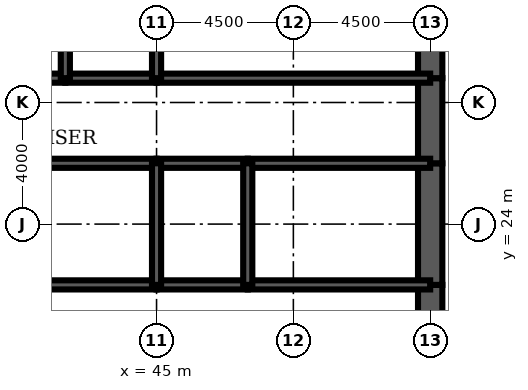
"""IFC4 building model, lengths in metres.
Left out: names, types, materials, properties, quantities, classifications, styles, units other than length and angle.
Written with IfcOpenShell. Run it as: python <this file> out.ifc"""

import sys

from ifc_helpers import new_model, si_unit, direction, frame, frame_2d, origin, place, context, subcontext, project, spatial, rectangle, extrude, element, fill, save


model = new_model("IFC4")
c1 = context("Model", 3, precision=1e-05, world=origin(), true_north=direction((0.0, 1.0)))
c2 = subcontext(c1, "Body", "Model", "MODEL_VIEW")
j1 = project(units=[si_unit("LENGTHUNIT", "METRE"), si_unit("PLANEANGLEUNIT", "RADIAN")], contexts=[c1])
p1 = place(None, origin())
s1 = spatial("IfcSite", under=j1, at=p1, CompositionType="ELEMENT")
p2 = place(p1, origin())
s2 = spatial("IfcBuilding", under=s1, at=p2, CompositionType="ELEMENT")
p3 = place(p2, frame((0.0, 0.0, 202.6)))
s3 = spatial("IfcBuildingStorey", under=s2, at=p3, CompositionType="ELEMENT", Elevation=202.6)
p4 = place(p3, frame((54.0, 19.2, 0.0), z_axis=(0.0, 0.0, 1.0), x_axis=(0.0, 1.0, 0.0)))
e1 = element("IfcWall", 1, at=p4, inside=s3, PredefinedType="SHEAR", context=c2, shape_type="SweptSolid", body=[
    extrude(rectangle(XDim=2.8, YDim=0.8, at=frame_2d((1.4, 0.0))), origin(), (0.0, 0.0, 1.0), 4.2),
])
p5 = place(p4, frame((0.4, 0.0, 0.0)))
e2 = element("IfcOpeningElement", 2, at=p5, cuts=e1, PredefinedType="OPENING", context=c2, shape_type="SweptSolid", body=[
    extrude(rectangle(XDim=1.8, YDim=2.1, at=frame_2d((0.9, 1.05))), frame((0.0, 0.41, 0.0), z_axis=(0.0, -1.0, 0.0), x_axis=(1.0, 0.0, 0.0)), (0.0, 0.0, 1.0), 0.82),
])
p6 = place(p3, frame((54.0, 22.0, 0.0), z_axis=(0.0, 0.0, 1.0), x_axis=(0.0, 1.0, 0.0)))
e3 = element("IfcWall", 3, at=p6, inside=s3, PredefinedType="SHEAR", context=c2, shape_type="SweptSolid", body=[
    extrude(rectangle(XDim=4.0, YDim=0.8, at=frame_2d((2.0, 0.0))), origin(), (0.0, 0.0, 1.0), 4.2),
])
p7 = place(p3, frame((54.0, 26.0, 0.0), z_axis=(0.0, 0.0, 1.0), x_axis=(0.0, 1.0, 0.0)))
e4 = element("IfcWall", 4, at=p7, inside=s3, PredefinedType="SHEAR", context=c2, shape_type="SweptSolid", body=[
    extrude(rectangle(XDim=2.8, YDim=0.8, at=frame_2d((1.4, 0.0))), origin(), (0.0, 0.0, 1.0), 4.2),
])
p8 = place(p7, frame((0.6, 0.0, 0.0)))
e5 = element("IfcOpeningElement", 5, at=p8, cuts=e4, PredefinedType="OPENING", context=c2, shape_type="SweptSolid", body=[
    extrude(rectangle(XDim=1.8, YDim=2.1, at=frame_2d((0.9, 1.05))), frame((0.0, 0.41, 0.0), z_axis=(0.0, -1.0, 0.0), x_axis=(1.0, 0.0, 0.0)), (0.0, 0.0, 1.0), 0.82),
])
p9 = place(p3, frame((54.0, 28.8, 0.0), z_axis=(0.0, 0.0, 1.0), x_axis=(0.0, 1.0, 0.0)))
e6 = element("IfcWall", 6, at=p9, inside=s3, PredefinedType="SHEAR", context=c2, shape_type="SweptSolid", body=[
    extrude(rectangle(XDim=3.2, YDim=0.8, at=frame_2d((1.6, 0.0))), origin(), (0.0, 0.0, 1.0), 4.2),
])
p10 = place(p3, frame((39.0, 28.8, 0.0), z_axis=(0.0, 0.0, 1.0), x_axis=(1.0, 0.0, 0.0)))
e7 = element("IfcWall", 7, at=p10, inside=s3, PredefinedType="SOLIDWALL", context=c2, shape_type="SweptSolid", body=[
    extrude(rectangle(XDim=3.0, YDim=0.3, at=frame_2d((1.5, 0.0))), origin(), (0.0, 0.0, 1.0), 4.2),
])
p11 = place(p3, frame((42.0, 28.8, 0.0), z_axis=(0.0, 0.0, 1.0), x_axis=(1.0, 0.0, 0.0)))
e8 = element("IfcWall", 8, at=p11, inside=s3, PredefinedType="SOLIDWALL", context=c2, shape_type="SweptSolid", body=[
    extrude(rectangle(XDim=3.0, YDim=0.3, at=frame_2d((1.5, 0.0))), origin(), (0.0, 0.0, 1.0), 4.2),
])
p12 = place(p11, frame((0.95, 0.0, 0.0)))
e9 = element("IfcOpeningElement", 9, at=p12, cuts=e8, PredefinedType="OPENING", context=c2, shape_type="SweptSolid", body=[
    extrude(rectangle(XDim=1.1, YDim=2.2, at=frame_2d((0.55, 1.1))), frame((0.0, 0.16, 0.0), z_axis=(0.0, -1.0, 0.0), x_axis=(1.0, 0.0, 0.0)), (0.0, 0.0, 1.0), 0.32),
])
p13 = place(p3, frame((45.0, 28.8, 0.0), z_axis=(0.0, 0.0, 1.0), x_axis=(1.0, 0.0, 0.0)))
e10 = element("IfcWall", 10, at=p13, inside=s3, PredefinedType="SOLIDWALL", context=c2, shape_type="SweptSolid", body=[
    extrude(rectangle(XDim=9.0, YDim=0.3, at=frame_2d((4.5, 0.0))), origin(), (0.0, 0.0, 1.0), 4.2),
])
p14 = place(p13, frame((7.35, 0.0, 0.0)))
e11 = element("IfcOpeningElement", 11, at=p14, cuts=e10, PredefinedType="OPENING", context=c2, shape_type="SweptSolid", body=[
    extrude(rectangle(XDim=1.0, YDim=2.1, at=frame_2d((0.5, 1.05))), frame((0.0, 0.16, 0.0), z_axis=(0.0, -1.0, 0.0), x_axis=(1.0, 0.0, 0.0)), (0.0, 0.0, 1.0), 0.32),
])
p15 = place(p3, frame((36.0, 22.0, 0.0), z_axis=(0.0, 0.0, 1.0), x_axis=(1.0, 0.0, 0.0)))
e12 = element("IfcWall", 12, at=p15, inside=s3, PredefinedType="SOLIDWALL", context=c2, shape_type="SweptSolid", body=[
    extrude(rectangle(XDim=9.0, YDim=0.3, at=frame_2d((4.5, 0.0))), origin(), (0.0, 0.0, 1.0), 4.2),
])
p16 = place(p15, frame((4.0, 0.0, 0.0)))
e13 = element("IfcOpeningElement", 13, at=p16, cuts=e12, PredefinedType="OPENING", context=c2, shape_type="SweptSolid", body=[
    extrude(rectangle(XDim=1.0, YDim=2.1, at=frame_2d((0.5, 1.05))), frame((0.0, 0.16, 0.0), z_axis=(0.0, -1.0, 0.0), x_axis=(1.0, 0.0, 0.0)), (0.0, 0.0, 1.0), 0.32),
])
p17 = place(p3, frame((45.0, 22.0, 0.0), z_axis=(0.0, 0.0, 1.0), x_axis=(1.0, 0.0, 0.0)))
e14 = element("IfcWall", 14, at=p17, inside=s3, PredefinedType="SOLIDWALL", context=c2, shape_type="SweptSolid", body=[
    extrude(rectangle(XDim=3.0, YDim=0.3, at=frame_2d((1.5, 0.0))), origin(), (0.0, 0.0, 1.0), 4.2),
])
p18 = place(p17, frame((1.0, 0.0, 0.0)))
e15 = element("IfcOpeningElement", 15, at=p18, cuts=e14, PredefinedType="OPENING", context=c2, shape_type="SweptSolid", body=[
    extrude(rectangle(XDim=1.0, YDim=2.1, at=frame_2d((0.5, 1.05))), frame((0.0, 0.16, 0.0), z_axis=(0.0, -1.0, 0.0), x_axis=(1.0, 0.0, 0.0)), (0.0, 0.0, 1.0), 0.32),
])
p19 = place(p3, frame((48.0, 22.0, 0.0), z_axis=(0.0, 0.0, 1.0), x_axis=(1.0, 0.0, 0.0)))
e16 = element("IfcWall", 16, at=p19, inside=s3, PredefinedType="SOLIDWALL", context=c2, shape_type="SweptSolid", body=[
    extrude(rectangle(XDim=6.0, YDim=0.3, at=frame_2d((3.0, 0.0))), origin(), (0.0, 0.0, 1.0), 4.2),
])
p20 = place(p19, frame((2.0, 0.0, 0.0)))
e17 = element("IfcOpeningElement", 17, at=p20, cuts=e16, PredefinedType="OPENING", context=c2, shape_type="SweptSolid", body=[
    extrude(rectangle(XDim=1.0, YDim=2.1, at=frame_2d((0.5, 1.05))), frame((0.0, 0.16, 0.0), z_axis=(0.0, -1.0, 0.0), x_axis=(1.0, 0.0, 0.0)), (0.0, 0.0, 1.0), 0.32),
])
p21 = place(p19, frame((4.35, 0.0, 0.0)))
e18 = element("IfcOpeningElement", 18, at=p21, cuts=e16, PredefinedType="OPENING", context=c2, shape_type="SweptSolid", body=[
    extrude(rectangle(XDim=1.0, YDim=2.1, at=frame_2d((0.5, 1.05))), frame((0.0, 0.16, 0.0), z_axis=(0.0, -1.0, 0.0), x_axis=(1.0, 0.0, 0.0)), (0.0, 0.0, 1.0), 0.32),
])
p22 = place(p3, frame((36.0, 26.0, 0.0), z_axis=(0.0, 0.0, 1.0), x_axis=(1.0, 0.0, 0.0)))
e19 = element("IfcWall", 19, at=p22, inside=s3, PredefinedType="SOLIDWALL", context=c2, shape_type="SweptSolid", body=[
    extrude(rectangle(XDim=9.0, YDim=0.3, at=frame_2d((4.5, 0.0))), origin(), (0.0, 0.0, 1.0), 4.2),
])
p23 = place(p3, frame((45.0, 26.0, 0.0), z_axis=(0.0, 0.0, 1.0), x_axis=(1.0, 0.0, 0.0)))
e20 = element("IfcWall", 20, at=p23, inside=s3, PredefinedType="SOLIDWALL", context=c2, shape_type="SweptSolid", body=[
    extrude(rectangle(XDim=3.0, YDim=0.3, at=frame_2d((1.5, 0.0))), origin(), (0.0, 0.0, 1.0), 4.2),
])
p24 = place(p3, frame((48.0, 26.0, 0.0), z_axis=(0.0, 0.0, 1.0), x_axis=(1.0, 0.0, 0.0)))
e21 = element("IfcWall", 21, at=p24, inside=s3, PredefinedType="SOLIDWALL", context=c2, shape_type="SweptSolid", body=[
    extrude(rectangle(XDim=6.0, YDim=0.3, at=frame_2d((3.0, 0.0))), origin(), (0.0, 0.0, 1.0), 4.2),
])
for number, where, z_axis, x_axis in (
    (22, (42.0, 28.8, 0.0), (0.0, 0.0, 1.0), (0.0, 1.0, 0.0)),
    (23, (45.0, 28.8, 0.0), (0.0, 0.0, 1.0), (0.0, 1.0, 0.0)),
):
    element("IfcWall", number, at=place(p3, frame(where, z_axis=z_axis, x_axis=x_axis)), inside=s3, PredefinedType="SOLIDWALL", context=c2, shape_type="SweptSolid", body=[
        extrude(rectangle(XDim=3.2, YDim=0.3, at=frame_2d((1.6, 0.0))), origin(), (0.0, 0.0, 1.0), 4.2),
    ])
for number, where, z_axis, x_axis in (
    (24, (45.0, 22.0, 0.0), (0.0, 0.0, 1.0), (0.0, 1.0, 0.0)),
    (25, (48.0, 22.0, 0.0), (0.0, 0.0, 1.0), (0.0, 1.0, 0.0)),
):
    element("IfcWall", number, at=place(p3, frame(where, z_axis=z_axis, x_axis=x_axis)), inside=s3, PredefinedType="SOLIDWALL", context=c2, shape_type="SweptSolid", body=[
        extrude(rectangle(XDim=4.0, YDim=0.3, at=frame_2d((2.0, 0.0))), origin(), (0.0, 0.0, 1.0), 4.2),
    ])
p25 = place(p3, frame((42.5, 22.15, 0.0), z_axis=(0.0, 0.0, 1.0), x_axis=(0.0, 1.0, 0.0)))
e26 = element("IfcWall", 26, at=p25, inside=s3, PredefinedType="PARTITIONING", context=c2, shape_type="SweptSolid", body=[
    extrude(rectangle(XDim=3.7, YDim=0.15, at=frame_2d((1.85, 0.0))), origin(), (0.0, 0.0, 1.0), 3.0),
])
p26 = place(p25, frame((2.2, 0.0, 0.0)))
e27 = element("IfcOpeningElement", 27, at=p26, cuts=e26, PredefinedType="OPENING", context=c2, shape_type="SweptSolid", body=[
    extrude(rectangle(XDim=1.0, YDim=2.1, at=frame_2d((0.5, 1.05))), frame((0.0, 0.085, 0.0), z_axis=(0.0, -1.0, 0.0), x_axis=(1.0, 0.0, 0.0)), (0.0, 0.0, 1.0), 0.17),
])
p27 = place(p3, frame((52.025, 22.15, 0.0), z_axis=(0.0, 0.0, 1.0), x_axis=(0.0, 1.0, 0.0)))
e28 = element("IfcWall", 28, at=p27, inside=s3, PredefinedType="PARTITIONING", context=c2, shape_type="SweptSolid", body=[
    extrude(rectangle(XDim=3.7, YDim=0.15, at=frame_2d((1.85, 0.0))), origin(), (0.0, 0.0, 1.0), 3.0),
])
p28 = place(p3, frame((49.2, 26.15, 0.0), z_axis=(0.0, 0.0, 1.0), x_axis=(0.0, 1.0, 0.0)))
e29 = element("IfcWall", 29, at=p28, inside=s3, PredefinedType="PARTITIONING", context=c2, shape_type="SweptSolid", body=[
    extrude(rectangle(XDim=2.5, YDim=0.15, at=frame_2d((1.25, 0.0))), origin(), (0.0, 0.0, 1.0), 3.0),
])
p29 = place(p28, frame((1.15, 0.0, 0.0)))
e30 = element("IfcOpeningElement", 30, at=p29, cuts=e29, PredefinedType="OPENING", context=c2, shape_type="SweptSolid", body=[
    extrude(rectangle(XDim=1.0, YDim=2.1, at=frame_2d((0.5, 1.05))), frame((0.0, 0.085, 0.0), z_axis=(0.0, -1.0, 0.0), x_axis=(1.0, 0.0, 0.0)), (0.0, 0.0, 1.0), 0.17),
])
p30 = place(p26, origin())
e31 = element("IfcDoor", 31, at=p30, inside=s3, OperationType="SINGLE_SWING_RIGHT", PredefinedType="DOOR", context=c2, shape_type="SweptSolid", body=[
    extrude(rectangle(XDim=1.0, YDim=2.1, at=frame_2d((0.5, 1.05))), frame((0.0, 0.025, 0.0), z_axis=(0.0, -1.0, 0.0), x_axis=(1.0, 0.0, 0.0)), (0.0, 0.0, 1.0), 0.05),
])
fill(e27, e31)
p31 = place(p29, origin())
e32 = element("IfcDoor", 32, at=p31, inside=s3, OperationType="SINGLE_SWING_RIGHT", PredefinedType="DOOR", context=c2, shape_type="SweptSolid", body=[
    extrude(rectangle(XDim=1.0, YDim=2.1, at=frame_2d((0.5, 1.05))), frame((0.0, 0.025, 0.0), z_axis=(0.0, -1.0, 0.0), x_axis=(1.0, 0.0, 0.0)), (0.0, 0.0, 1.0), 0.05),
])
fill(e30, e32)
p32 = place(p12, origin())
e33 = element("IfcDoor", 33, at=p32, inside=s3, OperationType="DOUBLE_DOOR_SLIDING", PredefinedType="USERDEFINED", context=c2, shape_type="SweptSolid", body=[
    extrude(rectangle(XDim=1.1, YDim=2.2, at=frame_2d((0.55, 1.1))), frame((0.0, 0.025, 0.0), z_axis=(0.0, -1.0, 0.0), x_axis=(1.0, 0.0, 0.0)), (0.0, 0.0, 1.0), 0.05),
])
fill(e9, e33)
p33 = place(p14, origin())
e34 = element("IfcDoor", 34, at=p33, inside=s3, OperationType="SINGLE_SWING_RIGHT", PredefinedType="DOOR", context=c2, shape_type="SweptSolid", body=[
    extrude(rectangle(XDim=1.0, YDim=2.1, at=frame_2d((0.5, 1.05))), frame((0.0, 0.025, 0.0), z_axis=(0.0, -1.0, 0.0), x_axis=(1.0, 0.0, 0.0)), (0.0, 0.0, 1.0), 0.05),
])
fill(e11, e34)
p34 = place(p5, origin())
e35 = element("IfcDoor", 35, at=p34, inside=s3, OperationType="SINGLE_SWING_LEFT", PredefinedType="DOOR", context=c2, shape_type="SweptSolid", body=[
    extrude(rectangle(XDim=1.8, YDim=2.1, at=frame_2d((0.9, 1.05))), frame((0.0, 0.4, 0.0), z_axis=(0.0, -1.0, 0.0), x_axis=(1.0, 0.0, 0.0)), (0.0, 0.0, 1.0), 0.8),
])
fill(e2, e35)
p35 = place(p8, origin())
e36 = element("IfcDoor", 36, at=p35, inside=s3, OperationType="SINGLE_SWING_LEFT", PredefinedType="DOOR", context=c2, shape_type="SweptSolid", body=[
    extrude(rectangle(XDim=1.8, YDim=2.1, at=frame_2d((0.9, 1.05))), frame((0.0, 0.4, 0.0), z_axis=(0.0, -1.0, 0.0), x_axis=(1.0, 0.0, 0.0)), (0.0, 0.0, 1.0), 0.8),
])
fill(e5, e36)
p36 = place(p18, origin())
e37 = element("IfcDoor", 37, at=p36, inside=s3, OperationType="SINGLE_SWING_LEFT", PredefinedType="DOOR", context=c2, shape_type="SweptSolid", body=[
    extrude(rectangle(XDim=1.0, YDim=2.1, at=frame_2d((0.5, 1.05))), frame((0.0, 0.025, 0.0), z_axis=(0.0, -1.0, 0.0), x_axis=(1.0, 0.0, 0.0)), (0.0, 0.0, 1.0), 0.05),
])
fill(e15, e37)
p37 = place(p20, origin())
e38 = element("IfcDoor", 38, at=p37, inside=s3, OperationType="SINGLE_SWING_LEFT", PredefinedType="DOOR", context=c2, shape_type="SweptSolid", body=[
    extrude(rectangle(XDim=1.0, YDim=2.1, at=frame_2d((0.5, 1.05))), frame((0.0, 0.025, 0.0), z_axis=(0.0, -1.0, 0.0), x_axis=(1.0, 0.0, 0.0)), (0.0, 0.0, 1.0), 0.05),
])
fill(e17, e38)
p38 = place(p21, origin())
e39 = element("IfcDoor", 39, at=p38, inside=s3, OperationType="SINGLE_SWING_RIGHT", PredefinedType="DOOR", context=c2, shape_type="SweptSolid", body=[
    extrude(rectangle(XDim=1.0, YDim=2.1, at=frame_2d((0.5, 1.05))), frame((0.0, 0.025, 0.0), z_axis=(0.0, -1.0, 0.0), x_axis=(1.0, 0.0, 0.0)), (0.0, 0.0, 1.0), 0.05),
])
fill(e18, e39)
save(model, sys.argv[1])
